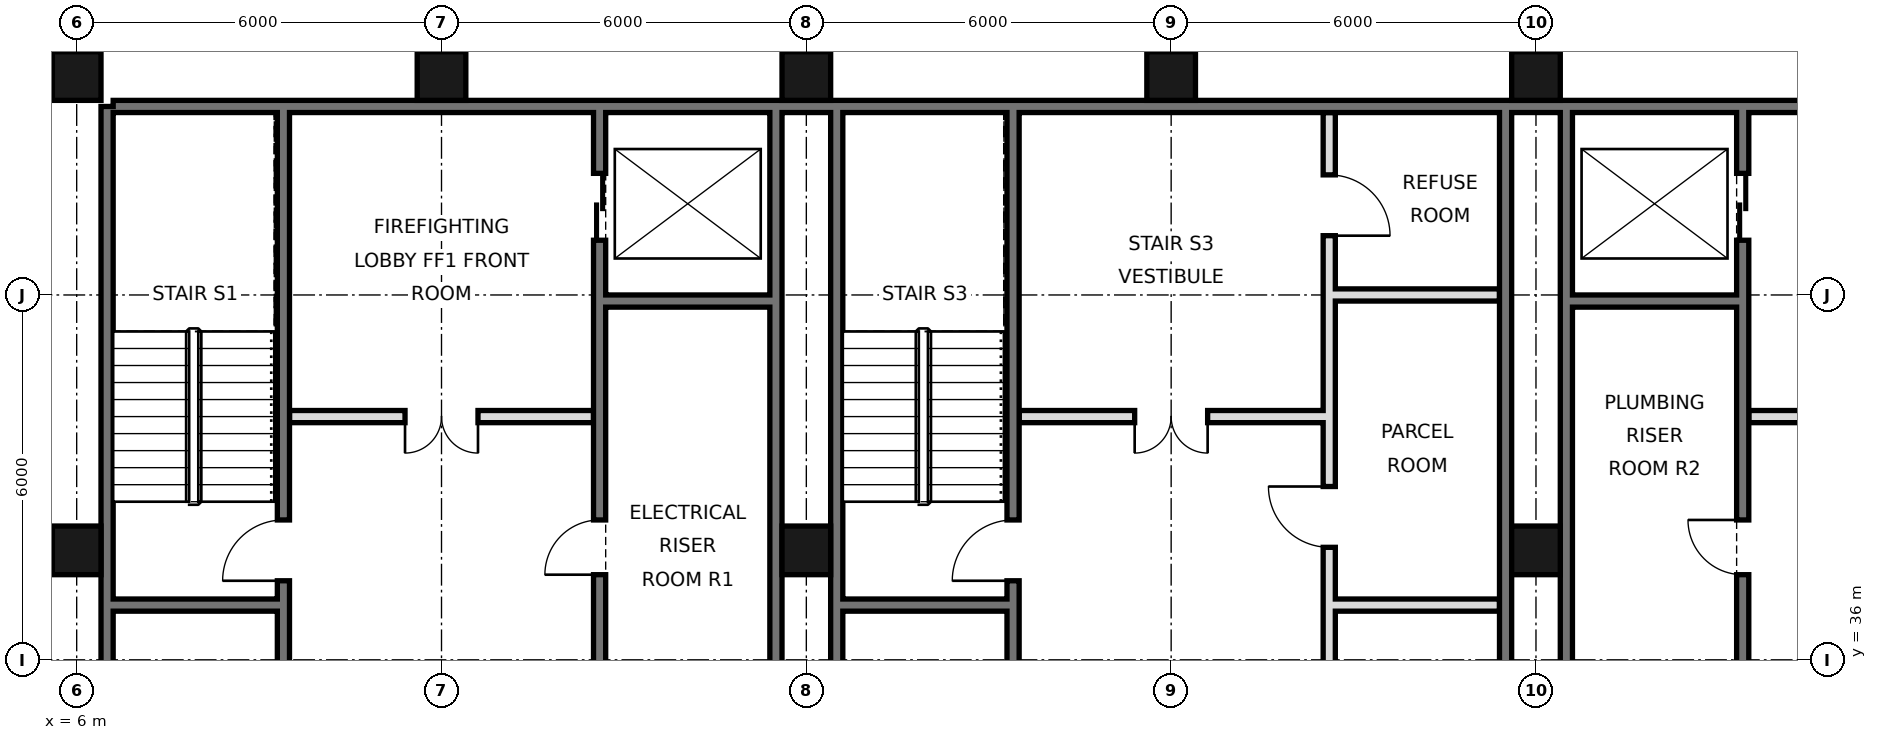
"""IFC4 building model, lengths in metres.
Left out: names, types, materials, properties, quantities, classifications, styles, units other than length and angle.
Written with IfcOpenShell. Run it as: python <this file> out.ifc"""

import sys

from ifc_helpers import new_model, si_unit, direction, frame, frame_2d, origin, origin_2d, place, context, subcontext, project, spatial, rectangle, hollow_rectangle, extrude, element, fill, save


model = new_model("IFC4")
c1 = context("Model", 3, precision=1e-05, world=origin(), true_north=direction((0.0, 1.0)))
c2 = subcontext(c1, "Body", "Model", "MODEL_VIEW")
j1 = project(units=[si_unit("LENGTHUNIT", "METRE"), si_unit("PLANEANGLEUNIT", "RADIAN")], contexts=[c1])
p1 = place(None, origin())
s1 = spatial("IfcSite", under=j1, at=p1, CompositionType="ELEMENT")
p2 = place(p1, origin())
s2 = spatial("IfcBuilding", under=s1, at=p2, CompositionType="ELEMENT")
p3 = place(p2, frame((0.0, 0.0, 273.8)))
s3 = spatial("IfcBuildingStorey", under=s2, at=p3, CompositionType="ELEMENT", Elevation=273.8)
for number, where, z_axis, x_axis in (
    (1, (6.0, 37.8, 0.0), (0.0, 0.0, 1.0), (1.0, 0.0, 0.0)),
    (2, (6.0, 45.6, 0.0), (0.0, 0.0, 1.0), (1.0, 0.0, 0.0)),
    (3, (12.0, 45.6, 0.0), (0.0, 0.0, 1.0), (1.0, 0.0, 0.0)),
    (4, (18.0, 37.8, 0.0), (0.0, 0.0, 1.0), (1.0, 0.0, 0.0)),
    (5, (18.0, 45.6, 0.0), (0.0, 0.0, 1.0), (1.0, 0.0, 0.0)),
    (6, (24.0, 45.6, 0.0), (0.0, 0.0, 1.0), (1.0, 0.0, 0.0)),
    (7, (30.0, 37.8, 0.0), (0.0, 0.0, 1.0), (1.0, 0.0, 0.0)),
    (8, (30.0, 45.6, 0.0), (0.0, 0.0, 1.0), (1.0, 0.0, 0.0)),
):
    element("IfcColumn", number, at=place(p3, frame(where, z_axis=z_axis, x_axis=x_axis)), inside=s3, PredefinedType="COLUMN", context=c2, shape_type="SweptSolid", body=[
        extrude(hollow_rectangle(XDim=0.8, YDim=0.8, WallThickness=0.032, at=origin_2d()), origin(), (0.0, 0.0, 1.0), 3.6),
    ])
p4 = place(p3, frame((6.5, 21.6, 0.0), z_axis=(0.0, 0.0, 1.0), x_axis=(0.0, 1.0, 0.0)))
e9 = element("IfcWall", 9, at=p4, inside=s3, PredefinedType="SOLIDWALL", context=c2, shape_type="SweptSolid", body=[
    extrude(rectangle(XDim=23.5, YDim=0.2, at=frame_2d((11.75, 0.0))), origin(), (0.0, 0.0, 1.0), 3.42),
])
p5 = place(p3, frame((6.6, 45.1, 0.0), z_axis=(0.0, 0.0, 1.0), x_axis=(1.0, 0.0, 0.0)))
e10 = element("IfcWall", 10, at=p5, inside=s3, PredefinedType="SOLIDWALL", context=c2, shape_type="SweptSolid", body=[
    extrude(rectangle(XDim=34.8, YDim=0.2, at=frame_2d((17.4, 0.0))), origin(), (0.0, 0.0, 1.0), 3.42),
])
for number, where, z_axis, x_axis in (
    (11, (17.5, 27.6, 0.0), (0.0, 0.0, 1.0), (0.0, 1.0, 0.0)),
    (12, (18.5, 27.6, 0.0), (0.0, 0.0, 1.0), (0.0, 1.0, 0.0)),
    (13, (29.5, 27.6, 0.0), (0.0, 0.0, 1.0), (0.0, 1.0, 0.0)),
    (14, (30.5, 27.6, 0.0), (0.0, 0.0, 1.0), (0.0, 1.0, 0.0)),
):
    element("IfcWall", number, at=place(p3, frame(where, z_axis=z_axis, x_axis=x_axis)), inside=s3, PredefinedType="SOLIDWALL", context=c2, shape_type="SweptSolid", body=[
        extrude(rectangle(XDim=17.5, YDim=0.2, at=frame_2d((8.75, 0.0))), origin(), (0.0, 0.0, 1.0), 3.42),
    ])
p6 = place(p3, frame((14.6, 27.5, 0.0), z_axis=(0.0, 0.0, 1.0), x_axis=(0.0, 1.0, 0.0)))
e15 = element("IfcWall", 15, at=p6, inside=s3, PredefinedType="SOLIDWALL", context=c2, shape_type="SweptSolid", body=[
    extrude(rectangle(XDim=17.5, YDim=0.2, at=frame_2d((8.75, 0.0))), origin(), (0.0, 0.0, 1.0), 3.42),
])
p7 = place(p6, frame((15.4, 0.0, 0.0)))
e16 = element("IfcOpeningElement", 16, at=p7, cuts=e15, PredefinedType="OPENING", context=c2, shape_type="SweptSolid", body=[
    extrude(rectangle(XDim=1.1, YDim=2.1, at=frame_2d((0.55, 1.05))), frame((0.0, 0.11, 0.0), z_axis=(0.0, -1.0, 0.0), x_axis=(1.0, 0.0, 0.0)), (0.0, 0.0, 1.0), 0.22),
])
p8 = place(p6, frame((2.7, 0.0, 0.0)))
e17 = element("IfcOpeningElement", 17, at=p8, cuts=e15, PredefinedType="OPENING", context=c2, shape_type="SweptSolid", body=[
    extrude(rectangle(XDim=1.0, YDim=2.1, at=frame_2d((0.5, 1.05))), frame((0.0, 0.11, 0.0), z_axis=(0.0, -1.0, 0.0), x_axis=(1.0, 0.0, 0.0)), (0.0, 0.0, 1.0), 0.22),
])
p9 = place(p6, frame((9.9, 0.0, 0.0)))
e18 = element("IfcOpeningElement", 18, at=p9, cuts=e15, PredefinedType="OPENING", context=c2, shape_type="SweptSolid", body=[
    extrude(rectangle(XDim=0.9, YDim=2.1, at=frame_2d((0.45, 1.05))), frame((0.0, 0.11, 0.0), z_axis=(0.0, -1.0, 0.0), x_axis=(1.0, 0.0, 0.0)), (0.0, 0.0, 1.0), 0.22),
])
p10 = place(p3, frame((21.4, 27.5, 0.0), z_axis=(0.0, 0.0, 1.0), x_axis=(0.0, 1.0, 0.0)))
e19 = element("IfcWall", 19, at=p10, inside=s3, PredefinedType="SOLIDWALL", context=c2, shape_type="SweptSolid", body=[
    extrude(rectangle(XDim=17.5, YDim=0.2, at=frame_2d((8.75, 0.0))), origin(), (0.0, 0.0, 1.0), 3.42),
])
p11 = place(p10, frame((0.55, 0.0, 0.0)))
e20 = element("IfcOpeningElement", 20, at=p11, cuts=e19, PredefinedType="OPENING", context=c2, shape_type="SweptSolid", body=[
    extrude(rectangle(XDim=1.0, YDim=2.1, at=frame_2d((0.5, 1.05))), frame((0.0, 0.11, 0.0), z_axis=(0.0, -1.0, 0.0), x_axis=(1.0, 0.0, 0.0)), (0.0, 0.0, 1.0), 0.22),
])
p12 = place(p10, frame((3.65, 0.0, 0.0)))
e21 = element("IfcOpeningElement", 21, at=p12, cuts=e19, PredefinedType="OPENING", context=c2, shape_type="SweptSolid", body=[
    extrude(rectangle(XDim=1.0, YDim=2.1, at=frame_2d((0.5, 1.05))), frame((0.0, 0.11, 0.0), z_axis=(0.0, -1.0, 0.0), x_axis=(1.0, 0.0, 0.0)), (0.0, 0.0, 1.0), 0.22),
])
p13 = place(p10, frame((9.8, 0.0, 0.0)))
e22 = element("IfcOpeningElement", 22, at=p13, cuts=e19, PredefinedType="OPENING", context=c2, shape_type="SweptSolid", body=[
    extrude(rectangle(XDim=1.0, YDim=2.1, at=frame_2d((0.5, 1.05))), frame((0.0, 0.11, 0.0), z_axis=(0.0, -1.0, 0.0), x_axis=(1.0, 0.0, 0.0)), (0.0, 0.0, 1.0), 0.22),
])
p14 = place(p10, frame((7.4, 0.0, 0.0)))
e23 = element("IfcOpeningElement", 23, at=p14, cuts=e19, PredefinedType="OPENING", context=c2, shape_type="SweptSolid", body=[
    extrude(rectangle(XDim=0.9, YDim=2.1, at=frame_2d((0.45, 1.05))), frame((0.0, 0.11, 0.0), z_axis=(0.0, -1.0, 0.0), x_axis=(1.0, 0.0, 0.0)), (0.0, 0.0, 1.0), 0.22),
])
p15 = place(p3, frame((26.6, 27.5, 0.0), z_axis=(0.0, 0.0, 1.0), x_axis=(0.0, 1.0, 0.0)))
e24 = element("IfcWall", 24, at=p15, inside=s3, PredefinedType="SOLIDWALL", context=c2, shape_type="SweptSolid", body=[
    extrude(rectangle(XDim=17.5, YDim=0.2, at=frame_2d((8.75, 0.0))), origin(), (0.0, 0.0, 1.0), 3.42),
])
p16 = place(p15, frame((4.3, 0.0, 0.0)))
e25 = element("IfcOpeningElement", 25, at=p16, cuts=e24, PredefinedType="OPENING", context=c2, shape_type="SweptSolid", body=[
    extrude(rectangle(XDim=0.9, YDim=2.1, at=frame_2d((0.45, 1.05))), frame((0.0, 0.11, 0.0), z_axis=(0.0, -1.0, 0.0), x_axis=(1.0, 0.0, 0.0)), (0.0, 0.0, 1.0), 0.22),
])
p17 = place(p15, frame((10.35, 0.0, 0.0)))
e26 = element("IfcOpeningElement", 26, at=p17, cuts=e24, PredefinedType="OPENING", context=c2, shape_type="SweptSolid", body=[
    extrude(rectangle(XDim=1.0, YDim=2.1, at=frame_2d((0.5, 1.05))), frame((0.0, 0.11, 0.0), z_axis=(0.0, -1.0, 0.0), x_axis=(1.0, 0.0, 0.0)), (0.0, 0.0, 1.0), 0.22),
])
p18 = place(p15, frame((15.475, 0.0, 0.0)))
e27 = element("IfcOpeningElement", 27, at=p18, cuts=e24, PredefinedType="OPENING", context=c2, shape_type="SweptSolid", body=[
    extrude(rectangle(XDim=1.0, YDim=2.1, at=frame_2d((0.5, 1.05))), frame((0.0, 0.11, 0.0), z_axis=(0.0, -1.0, 0.0), x_axis=(1.0, 0.0, 0.0)), (0.0, 0.0, 1.0), 0.22),
])
p19 = place(p3, frame((33.4, 27.5, 0.0), z_axis=(0.0, 0.0, 1.0), x_axis=(0.0, 1.0, 0.0)))
e28 = element("IfcWall", 28, at=p19, inside=s3, PredefinedType="SOLIDWALL", context=c2, shape_type="SweptSolid", body=[
    extrude(rectangle(XDim=17.5, YDim=0.2, at=frame_2d((8.75, 0.0))), origin(), (0.0, 0.0, 1.0), 3.42),
])
p20 = place(p19, frame((1.1, 0.0, 0.0)))
e29 = element("IfcOpeningElement", 29, at=p20, cuts=e28, PredefinedType="OPENING", context=c2, shape_type="SweptSolid", body=[
    extrude(rectangle(XDim=1.1, YDim=2.1, at=frame_2d((0.55, 1.05))), frame((0.0, 0.11, 0.0), z_axis=(0.0, -1.0, 0.0), x_axis=(1.0, 0.0, 0.0)), (0.0, 0.0, 1.0), 0.22),
])
p21 = place(p19, frame((4.2, 0.0, 0.0)))
e30 = element("IfcOpeningElement", 30, at=p21, cuts=e28, PredefinedType="OPENING", context=c2, shape_type="SweptSolid", body=[
    extrude(rectangle(XDim=1.1, YDim=2.1, at=frame_2d((0.55, 1.05))), frame((0.0, 0.11, 0.0), z_axis=(0.0, -1.0, 0.0), x_axis=(1.0, 0.0, 0.0)), (0.0, 0.0, 1.0), 0.22),
])
p22 = place(p19, frame((15.4, 0.0, 0.0)))
e31 = element("IfcOpeningElement", 31, at=p22, cuts=e28, PredefinedType="OPENING", context=c2, shape_type="SweptSolid", body=[
    extrude(rectangle(XDim=1.1, YDim=2.1, at=frame_2d((0.55, 1.05))), frame((0.0, 0.11, 0.0), z_axis=(0.0, -1.0, 0.0), x_axis=(1.0, 0.0, 0.0)), (0.0, 0.0, 1.0), 0.22),
])
p23 = place(p19, frame((9.9, 0.0, 0.0)))
e32 = element("IfcOpeningElement", 32, at=p23, cuts=e28, PredefinedType="OPENING", context=c2, shape_type="SweptSolid", body=[
    extrude(rectangle(XDim=0.9, YDim=2.1, at=frame_2d((0.45, 1.05))), frame((0.0, 0.11, 0.0), z_axis=(0.0, -1.0, 0.0), x_axis=(1.0, 0.0, 0.0)), (0.0, 0.0, 1.0), 0.22),
])
p24 = place(p3, frame((9.4, 21.6, 0.0), z_axis=(0.0, 0.0, 1.0), x_axis=(0.0, 1.0, 0.0)))
e33 = element("IfcWall", 33, at=p24, inside=s3, PredefinedType="SOLIDWALL", context=c2, shape_type="SweptSolid", body=[
    extrude(rectangle(XDim=23.4, YDim=0.2, at=frame_2d((11.7, 0.0))), origin(), (0.0, 0.0, 1.0), 3.42),
])
p25 = place(p24, frame((7.8, 0.0, 0.0)))
e34 = element("IfcOpeningElement", 34, at=p25, cuts=e33, PredefinedType="OPENING", context=c2, shape_type="SweptSolid", body=[
    extrude(rectangle(XDim=1.0, YDim=2.1, at=frame_2d((0.5, 1.05))), frame((0.0, 0.11, 0.0), z_axis=(0.0, -1.0, 0.0), x_axis=(1.0, 0.0, 0.0)), (0.0, 0.0, 1.0), 0.22),
])
p26 = place(p24, frame((12.45, 0.0, 0.0)))
e35 = element("IfcOpeningElement", 35, at=p26, cuts=e33, PredefinedType="OPENING", context=c2, shape_type="SweptSolid", body=[
    extrude(rectangle(XDim=1.0, YDim=2.1, at=frame_2d((0.5, 1.05))), frame((0.0, 0.11, 0.0), z_axis=(0.0, -1.0, 0.0), x_axis=(1.0, 0.0, 0.0)), (0.0, 0.0, 1.0), 0.22),
])
p27 = place(p24, frame((15.7, 0.0, 0.0)))
e36 = element("IfcOpeningElement", 36, at=p27, cuts=e33, PredefinedType="OPENING", context=c2, shape_type="SweptSolid", body=[
    extrude(rectangle(XDim=1.0, YDim=2.1, at=frame_2d((0.5, 1.05))), frame((0.0, 0.11, 0.0), z_axis=(0.0, -1.0, 0.0), x_axis=(1.0, 0.0, 0.0)), (0.0, 0.0, 1.0), 0.22),
])
p28 = place(p24, frame((0.175, 0.0, 0.0)))
e37 = element("IfcOpeningElement", 37, at=p28, cuts=e33, PredefinedType="OPENING", context=c2, shape_type="SweptSolid", body=[
    extrude(rectangle(XDim=0.9, YDim=2.1, at=frame_2d((0.45, 1.05))), frame((0.0, 0.11, 0.0), z_axis=(0.0, -1.0, 0.0), x_axis=(1.0, 0.0, 0.0)), (0.0, 0.0, 1.0), 0.22),
])
for number, where, z_axis, x_axis in (
    (38, (18.6, 36.9, 0.0), (0.0, 0.0, 1.0), (1.0, 0.0, 0.0)),
    (39, (26.7, 36.9, 0.0), (0.0, 0.0, 1.0), (1.0, 0.0, 0.0)),
    (40, (6.6, 36.9, 0.0), (0.0, 0.0, 1.0), (1.0, 0.0, 0.0)),
):
    element("IfcWall", number, at=place(p3, frame(where, z_axis=z_axis, x_axis=x_axis)), inside=s3, PredefinedType="SOLIDWALL", context=c2, shape_type="SweptSolid", body=[
        extrude(rectangle(XDim=2.7, YDim=0.2, at=frame_2d((1.35, 0.0))), origin(), (0.0, 0.0, 1.0), 3.42),
    ])
p29 = place(p3, frame((21.5, 40.0, 0.0), z_axis=(0.0, 0.0, 1.0), x_axis=(1.0, 0.0, 0.0)))
e41 = element("IfcWall", 41, at=p29, inside=s3, PredefinedType="PARTITIONING", context=c2, shape_type="SweptSolid", body=[
    extrude(rectangle(XDim=5.0, YDim=0.2, at=frame_2d((2.5, 0.0))), origin(), (0.0, 0.0, 1.0), 3.42),
])
p30 = place(p29, frame((1.9, 0.0, 0.0)))
e42 = element("IfcOpeningElement", 42, at=p30, cuts=e41, PredefinedType="OPENING", context=c2, shape_type="SweptSolid", body=[
    extrude(rectangle(XDim=1.2, YDim=2.1, at=frame_2d((0.6, 1.05))), frame((0.0, 0.11, 0.0), z_axis=(0.0, -1.0, 0.0), x_axis=(1.0, 0.0, 0.0)), (0.0, 0.0, 1.0), 0.22),
])
p31 = place(p3, frame((33.5, 40.0, 0.0), z_axis=(0.0, 0.0, 1.0), x_axis=(1.0, 0.0, 0.0)))
e43 = element("IfcWall", 43, at=p31, inside=s3, PredefinedType="PARTITIONING", context=c2, shape_type="SweptSolid", body=[
    extrude(rectangle(XDim=5.0, YDim=0.2, at=frame_2d((2.5, 0.0))), origin(), (0.0, 0.0, 1.0), 3.42),
])
p32 = place(p31, frame((1.9, 0.0, 0.0)))
e44 = element("IfcOpeningElement", 44, at=p32, cuts=e43, PredefinedType="OPENING", context=c2, shape_type="SweptSolid", body=[
    extrude(rectangle(XDim=1.2, YDim=2.1, at=frame_2d((0.6, 1.05))), frame((0.0, 0.11, 0.0), z_axis=(0.0, -1.0, 0.0), x_axis=(1.0, 0.0, 0.0)), (0.0, 0.0, 1.0), 0.22),
])
p33 = place(p3, frame((9.5, 40.0, 0.0), z_axis=(0.0, 0.0, 1.0), x_axis=(1.0, 0.0, 0.0)))
e45 = element("IfcWall", 45, at=p33, inside=s3, PredefinedType="PARTITIONING", context=c2, shape_type="SweptSolid", body=[
    extrude(rectangle(XDim=5.0, YDim=0.2, at=frame_2d((2.5, 0.0))), origin(), (0.0, 0.0, 1.0), 3.42),
])
p34 = place(p33, frame((1.9, 0.0, 0.0)))
e46 = element("IfcOpeningElement", 46, at=p34, cuts=e45, PredefinedType="OPENING", context=c2, shape_type="SweptSolid", body=[
    extrude(rectangle(XDim=1.2, YDim=2.1, at=frame_2d((0.6, 1.05))), frame((0.0, 0.11, 0.0), z_axis=(0.0, -1.0, 0.0), x_axis=(1.0, 0.0, 0.0)), (0.0, 0.0, 1.0), 0.22),
])
for number, where, z_axis, x_axis in (
    (47, (14.7, 41.9, 0.0), (0.0, 0.0, 1.0), (1.0, 0.0, 0.0)),
    (48, (30.6, 41.9, 0.0), (0.0, 0.0, 1.0), (1.0, 0.0, 0.0)),
):
    element("IfcWall", number, at=place(p3, frame(where, z_axis=z_axis, x_axis=x_axis)), inside=s3, PredefinedType="SOLIDWALL", context=c2, shape_type="SweptSolid", body=[
        extrude(rectangle(XDim=2.7, YDim=0.2, at=frame_2d((1.35, 0.0))), origin(), (0.0, 0.0, 1.0), 3.42),
    ])
p35 = place(p3, frame((26.7, 42.0, 0.0), z_axis=(0.0, 0.0, 1.0), x_axis=(1.0, 0.0, 0.0)))
e49 = element("IfcWall", 49, at=p35, inside=s3, PredefinedType="PARTITIONING", context=c2, shape_type="SweptSolid", body=[
    extrude(rectangle(XDim=2.7, YDim=0.2, at=frame_2d((1.35, 0.0))), origin(), (0.0, 0.0, 1.0), 3.42),
])
p36 = place(p34, frame((1.2, 0.0, 0.0), z_axis=(0.0, 0.0, 1.0), x_axis=(-1.0, 0.0, 0.0)))
e50 = element("IfcDoor", 50, at=p36, inside=s3, OperationType="DOUBLE_DOOR_SINGLE_SWING", PredefinedType="DOOR", context=c2, shape_type="SweptSolid", body=[
    extrude(rectangle(XDim=1.2, YDim=2.1, at=frame_2d((0.6, 1.05))), frame((0.0, 0.025, 0.0), z_axis=(0.0, -1.0, 0.0), x_axis=(1.0, 0.0, 0.0)), (0.0, 0.0, 1.0), 0.05),
])
fill(e46, e50)
p37 = place(p30, frame((1.2, 0.0, 0.0), z_axis=(0.0, 0.0, 1.0), x_axis=(-1.0, 0.0, 0.0)))
e51 = element("IfcDoor", 51, at=p37, inside=s3, OperationType="DOUBLE_DOOR_SINGLE_SWING", PredefinedType="DOOR", context=c2, shape_type="SweptSolid", body=[
    extrude(rectangle(XDim=1.2, YDim=2.1, at=frame_2d((0.6, 1.05))), frame((0.0, 0.025, 0.0), z_axis=(0.0, -1.0, 0.0), x_axis=(1.0, 0.0, 0.0)), (0.0, 0.0, 1.0), 0.05),
])
fill(e42, e51)
p38 = place(p22, origin())
e52 = element("IfcDoor", 52, at=p38, inside=s3, OperationType="DOUBLE_DOOR_SLIDING", PredefinedType="DOOR", context=c2, shape_type="SweptSolid", body=[
    extrude(rectangle(XDim=1.1, YDim=2.1, at=frame_2d((0.55, 1.05))), frame((0.0, 0.025, 0.0), z_axis=(0.0, -1.0, 0.0), x_axis=(1.0, 0.0, 0.0)), (0.0, 0.0, 1.0), 0.05),
])
fill(e31, e52)
p39 = place(p7, origin())
e53 = element("IfcDoor", 53, at=p39, inside=s3, OperationType="DOUBLE_DOOR_SLIDING", PredefinedType="DOOR", context=c2, shape_type="SweptSolid", body=[
    extrude(rectangle(XDim=1.1, YDim=2.1, at=frame_2d((0.55, 1.05))), frame((0.0, 0.025, 0.0), z_axis=(0.0, -1.0, 0.0), x_axis=(1.0, 0.0, 0.0)), (0.0, 0.0, 1.0), 0.05),
])
fill(e16, e53)
p40 = place(p27, origin())
e54 = element("IfcDoor", 54, at=p40, inside=s3, OperationType="SINGLE_SWING_LEFT", PredefinedType="DOOR", context=c2, shape_type="SweptSolid", body=[
    extrude(rectangle(XDim=1.0, YDim=2.1, at=frame_2d((0.5, 1.05))), frame((0.0, 0.025, 0.0), z_axis=(0.0, -1.0, 0.0), x_axis=(1.0, 0.0, 0.0)), (0.0, 0.0, 1.0), 0.05),
])
fill(e36, e54)
p41 = place(p13, origin())
e55 = element("IfcDoor", 55, at=p41, inside=s3, OperationType="SINGLE_SWING_LEFT", PredefinedType="DOOR", context=c2, shape_type="SweptSolid", body=[
    extrude(rectangle(XDim=1.0, YDim=2.1, at=frame_2d((0.5, 1.05))), frame((0.0, 0.025, 0.0), z_axis=(0.0, -1.0, 0.0), x_axis=(1.0, 0.0, 0.0)), (0.0, 0.0, 1.0), 0.05),
])
fill(e22, e55)
p42 = place(p9, origin())
e56 = element("IfcDoor", 56, at=p42, inside=s3, OperationType="SINGLE_SWING_LEFT", PredefinedType="DOOR", context=c2, shape_type="SweptSolid", body=[
    extrude(rectangle(XDim=0.9, YDim=2.1, at=frame_2d((0.45, 1.05))), frame((0.0, 0.025, 0.0), z_axis=(0.0, -1.0, 0.0), x_axis=(1.0, 0.0, 0.0)), (0.0, 0.0, 1.0), 0.05),
])
fill(e18, e56)
p43 = place(p23, frame((0.9, 0.0, 0.0), z_axis=(0.0, 0.0, 1.0), x_axis=(-1.0, 0.0, 0.0)))
e57 = element("IfcDoor", 57, at=p43, inside=s3, OperationType="SINGLE_SWING_LEFT", PredefinedType="DOOR", context=c2, shape_type="SweptSolid", body=[
    extrude(rectangle(XDim=0.9, YDim=2.1, at=frame_2d((0.45, 1.05))), frame((0.0, 0.025, 0.0), z_axis=(0.0, -1.0, 0.0), x_axis=(1.0, 0.0, 0.0)), (0.0, 0.0, 1.0), 0.05),
])
fill(e32, e57)
p44 = place(p17, frame((1.0, 0.0, 0.0), z_axis=(0.0, 0.0, 1.0), x_axis=(-1.0, 0.0, 0.0)))
e58 = element("IfcDoor", 58, at=p44, inside=s3, OperationType="SINGLE_SWING_LEFT", PredefinedType="DOOR", context=c2, shape_type="SweptSolid", body=[
    extrude(rectangle(XDim=1.0, YDim=2.1, at=frame_2d((0.5, 1.05))), frame((0.0, 0.025, 0.0), z_axis=(0.0, -1.0, 0.0), x_axis=(1.0, 0.0, 0.0)), (0.0, 0.0, 1.0), 0.05),
])
fill(e26, e58)
p45 = place(p18, frame((1.0, 0.0, 0.0), z_axis=(0.0, 0.0, 1.0), x_axis=(-1.0, 0.0, 0.0)))
e59 = element("IfcDoor", 59, at=p45, inside=s3, OperationType="SINGLE_SWING_RIGHT", PredefinedType="DOOR", context=c2, shape_type="SweptSolid", body=[
    extrude(rectangle(XDim=1.0, YDim=2.1, at=frame_2d((0.5, 1.05))), frame((0.0, 0.025, 0.0), z_axis=(0.0, -1.0, 0.0), x_axis=(1.0, 0.0, 0.0)), (0.0, 0.0, 1.0), 0.05),
])
fill(e27, e59)
save(model, sys.argv[1])
